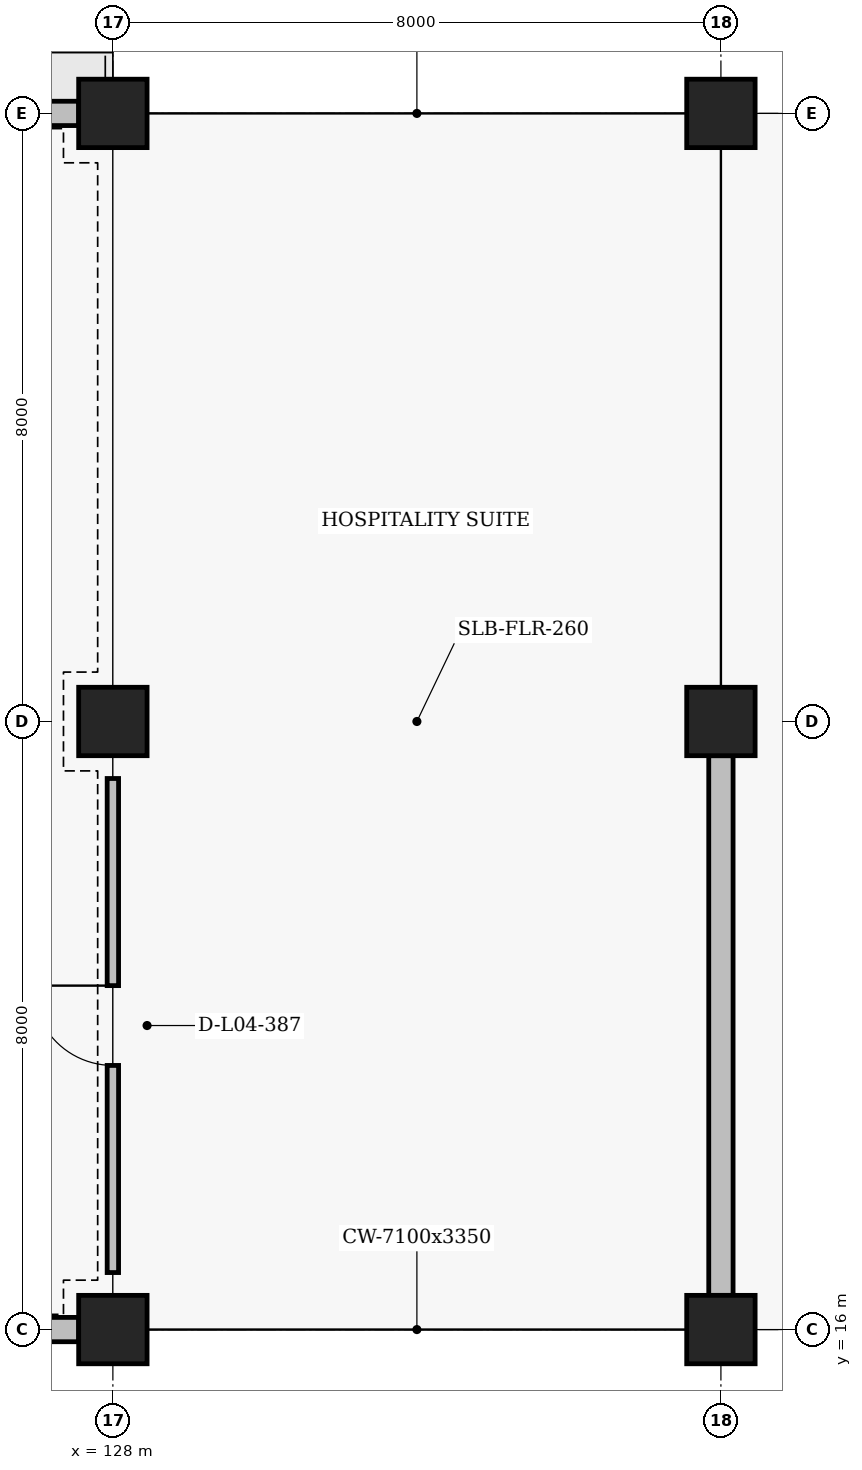
"""IFC4 building model, lengths in metres.
Left out: names, types, materials, properties, quantities, classifications, styles, units other than length and angle.
Written with IfcOpenShell. Run it as: python <this file> out.ifc"""

import sys

from ifc_helpers import new_model, si_unit, direction, frame, frame_2d, origin, origin_2d, place, context, subcontext, project, spatial, rectangle, extrude, element, fill, save


model = new_model("IFC4")
c1 = context("Model", 3, precision=1e-05, world=origin(), true_north=direction((0.0, 1.0)))
c2 = subcontext(c1, "Body", "Model", "MODEL_VIEW")
j1 = project(units=[si_unit("LENGTHUNIT", "METRE"), si_unit("PLANEANGLEUNIT", "RADIAN")], contexts=[c1])
p1 = place(None, origin())
s1 = spatial("IfcSite", under=j1, at=p1, CompositionType="ELEMENT")
p2 = place(p1, origin())
s2 = spatial("IfcBuilding", under=s1, at=p2, CompositionType="ELEMENT")
p3 = place(p2, frame((0.0, 0.0, 14.4)))
s3 = spatial("IfcBuildingStorey", under=s2, at=p3, CompositionType="ELEMENT", Elevation=14.4)
for number, where, z_axis, x_axis in (
    (1, (128.0, 16.0, 0.0), (0.0, 0.0, 1.0), (1.0, 0.0, 0.0)),
    (2, (128.0, 24.0, 0.0), (0.0, 0.0, 1.0), (1.0, 0.0, 0.0)),
    (3, (128.0, 32.0, 0.0), (0.0, 0.0, 1.0), (1.0, 0.0, 0.0)),
    (4, (136.0, 16.0, 0.0), (0.0, 0.0, 1.0), (1.0, 0.0, 0.0)),
    (5, (136.0, 24.0, 0.0), (0.0, 0.0, 1.0), (1.0, 0.0, 0.0)),
    (6, (136.0, 32.0, 0.0), (0.0, 0.0, 1.0), (1.0, 0.0, 0.0)),
):
    element("IfcColumn", number, at=place(p3, frame(where, z_axis=z_axis, x_axis=x_axis)), inside=s3, PredefinedType="COLUMN", context=c2, shape_type="SweptSolid", body=[
        extrude(rectangle(XDim=0.9, YDim=0.9, at=origin_2d()), origin(), (0.0, 0.0, 1.0), 4.2),
    ])
p4 = place(p3, frame((120.45, 16.0, 0.0), z_axis=(0.0, 0.0, 1.0), x_axis=(1.0, 0.0, 0.0)))
e7 = element("IfcWall", 7, at=p4, inside=s3, PredefinedType="SOLIDWALL", context=c2, shape_type="SweptSolid", body=[
    extrude(rectangle(XDim=7.1, YDim=0.32, at=frame_2d((3.55, 0.0))), origin(), (0.0, 0.0, 1.0), 3.35),
])
p5 = place(p3, frame((120.45, 32.0, 0.0), z_axis=(0.0, 0.0, 1.0), x_axis=(1.0, 0.0, 0.0)))
e8 = element("IfcWall", 8, at=p5, inside=s3, PredefinedType="SOLIDWALL", context=c2, shape_type="SweptSolid", body=[
    extrude(rectangle(XDim=7.1, YDim=0.32, at=frame_2d((3.55, 0.0))), origin(), (0.0, 0.0, 1.0), 3.1),
])
p6 = place(p3, frame((136.0, 16.45, 0.0), z_axis=(0.0, 0.0, 1.0), x_axis=(0.0, 1.0, 0.0)))
e9 = element("IfcWall", 9, at=p6, inside=s3, PredefinedType="SOLIDWALL", context=c2, shape_type="SweptSolid", body=[
    extrude(rectangle(XDim=7.1, YDim=0.32, at=frame_2d((3.55, 0.0))), origin(), (0.0, 0.0, 1.0), 3.35),
])
p7 = place(p3, frame((128.0, 16.75, 0.0), z_axis=(0.0, 0.0, 1.0), x_axis=(0.0, 1.0, 0.0)))
e10 = element("IfcWall", 10, at=p7, inside=s3, PredefinedType="PARTITIONING", context=c2, shape_type="SweptSolid", body=[
    extrude(rectangle(XDim=6.5, YDim=0.15, at=frame_2d((3.25, 0.0))), origin(), (0.0, 0.0, 1.0), 3.37),
])
p8 = place(p7, frame((2.725, 0.0, 0.0)))
e11 = element("IfcOpeningElement", 11, at=p8, cuts=e10, PredefinedType="OPENING", context=c2, shape_type="SweptSolid", body=[
    extrude(rectangle(XDim=1.05, YDim=2.15, at=frame_2d((0.525, 1.075))), frame((0.0, 0.085, 0.0), z_axis=(0.0, -1.0, 0.0), x_axis=(1.0, 0.0, 0.0)), (0.0, 0.0, 1.0), 0.17),
])
p9 = place(p8, origin())
e12 = element("IfcDoor", 12, at=p9, inside=s3, OperationType="SINGLE_SWING_RIGHT", PredefinedType="DOOR", context=c2, shape_type="SweptSolid", body=[
    extrude(rectangle(XDim=1.05, YDim=2.15, at=frame_2d((0.525, 1.075))), frame((0.0, 0.025, 0.0), z_axis=(0.0, -1.0, 0.0), x_axis=(1.0, 0.0, 0.0)), (0.0, 0.0, 1.0), 0.05),
])
fill(e11, e12)
save(model, sys.argv[1])
